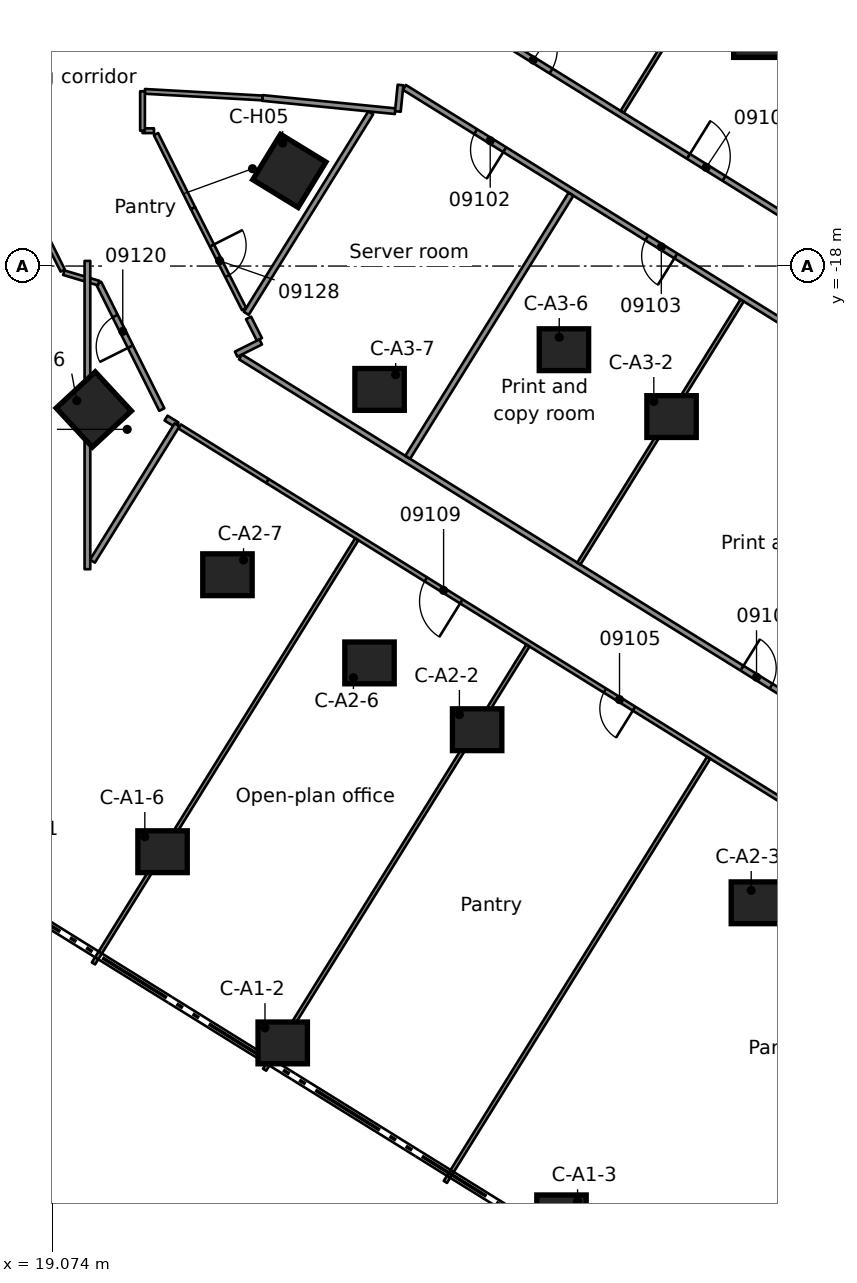
"""IFC4 building model, lengths in metres.
Left out: names, types, materials, properties, quantities, classifications, styles, units other than length and angle.
Written with IfcOpenShell. Run it as: python <this file> out.ifc"""

import sys

from ifc_helpers import new_model, si_unit, direction, frame, frame_2d, origin, origin_2d, place, context, subcontext, project, spatial, rectangle, extrude, element, fill, save


model = new_model("IFC4")
c1 = context("Model", 3, precision=1e-05, world=origin(), true_north=direction((0.0, 1.0)))
c2 = subcontext(c1, "Body", "Model", "MODEL_VIEW")
j1 = project(units=[si_unit("LENGTHUNIT", "METRE"), si_unit("PLANEANGLEUNIT", "RADIAN")], contexts=[c1])
p1 = place(None, origin())
s1 = spatial("IfcSite", under=j1, at=p1, CompositionType="ELEMENT")
p2 = place(p1, origin())
s2 = spatial("IfcBuilding", under=s1, at=p2, CompositionType="ELEMENT")
p3 = place(p2, frame((0.0, 0.0, 40.8)))
s3 = spatial("IfcBuildingStorey", under=s2, at=p3, CompositionType="ELEMENT", Elevation=40.8)
for number, where, z_axis, x_axis in (
    (1, (25.139, -38.441, 0.0), (0.0, 0.0, 1.0), (1.0, 0.0, 0.0)),
    (2, (32.475, -42.992, 0.0), (0.0, 0.0, 1.0), (1.0, 0.0, 0.0)),
    (3, (21.977, -33.41, 0.0), (0.0, 0.0, 1.0), (1.0, 0.0, 0.0)),
    (4, (30.255, -30.2, 0.0), (0.0, 0.0, 1.0), (1.0, 0.0, 0.0)),
    (5, (37.59, -34.754, 0.0), (0.0, 0.0, 1.0), (1.0, 0.0, 0.0)),
    (6, (27.423, -28.442, 0.0), (0.0, 0.0, 1.0), (1.0, 0.0, 0.0)),
    (7, (23.685, -26.122, 0.0), (0.0, 0.0, 1.0), (1.0, 0.0, 0.0)),
    (8, (35.371, -21.96, 0.0), (0.0, 0.0, 1.0), (1.0, 0.0, 0.0)),
    (9, (32.539, -20.201, 0.0), (0.0, 0.0, 1.0), (1.0, 0.0, 0.0)),
    (10, (27.688, -21.246, 0.0), (0.0, 0.0, 1.0), (1.0, 0.0, 0.0)),
    (11, (37.655, -11.96, 0.0), (0.0, 0.0, 1.0), (1.0, 0.0, 0.0)),
):
    element("IfcColumn", number, at=place(p3, frame(where, z_axis=z_axis, x_axis=x_axis)), inside=s3, PredefinedType="COLUMN", context=c2, shape_type="SweptSolid", body=[
        extrude(rectangle(XDim=1.3, YDim=1.1, at=origin_2d()), origin(), (0.0, 0.0, 1.0), 3.5),
    ])
for number, where, z_axis, x_axis in (
    (12, (25.313, -15.495, 0.0), (0.0, 0.0, 1.0), (0.853, -0.522, 0.0)),
    (13, (20.167, -21.774, 0.0), (0.0, 0.0, 1.0), (0.68, -0.734, 0.0)),
):
    element("IfcColumn", number, at=place(p3, frame(where, z_axis=z_axis, x_axis=x_axis)), inside=s3, PredefinedType="COLUMN", context=c2, shape_type="SweptSolid", body=[
        extrude(rectangle(XDim=1.4, YDim=1.4, at=origin_2d()), origin(), (0.0, 0.0, 1.0), 3.5),
    ])
p4 = place(p3, frame((17.564, -14.541, 0.0), z_axis=(0.0, 0.0, 1.0), x_axis=(0.446749443477, -0.894659116509, 0.0)))
e14 = element("IfcWall", 14, at=p4, inside=s3, PredefinedType="PARTITIONING", context=c2, shape_type="SweptSolid", body=[
    extrude(rectangle(XDim=3.998, YDim=0.125, at=frame_2d((1.999, 0.0))), origin(), (0.0, 0.0, 1.0), 3.06),
])
p5 = place(p3, frame((21.957, -21.776, 0.0), z_axis=(0.0, 0.0, 1.0), x_axis=(-0.446609612261, 0.894728927797, 0.0)))
e15 = element("IfcWall", 15, at=p5, inside=s3, PredefinedType="PARTITIONING", context=c2, shape_type="SweptSolid", body=[
    extrude(rectangle(XDim=3.719, YDim=0.15, at=frame_2d((1.86, 0.0))), origin(), (0.0, 0.0, 1.0), 3.06),
])
p6 = place(p5, frame((1.85, 0.0, 0.0)))
e16 = element("IfcOpeningElement", 16, at=p6, cuts=e15, PredefinedType="OPENING", context=c2, shape_type="SweptSolid", body=[
    extrude(rectangle(XDim=0.9, YDim=2.1, at=frame_2d((0.45, 1.05))), frame((0.0, 0.085, 0.0), z_axis=(0.0, -1.0, 0.0), x_axis=(1.0, 0.0, 0.0)), (0.0, 0.0, 1.0), 0.17),
])
p7 = place(p3, frame((21.805, -14.527, 0.0), z_axis=(0.0, 0.0, 1.0), x_axis=(0.446720903114, -0.894673367616, 0.0)))
e17 = element("IfcWall", 17, at=p7, inside=s3, PredefinedType="PARTITIONING", context=c2, shape_type="SweptSolid", body=[
    extrude(rectangle(XDim=2.181, YDim=0.125, at=frame_2d((1.09, 0.0))), origin(), (0.0, 0.0, 1.0), 3.06),
])
p8 = place(p3, frame((24.24, -19.364, 0.0), z_axis=(0.0, 0.0, 1.0), x_axis=(0.451527001133, -0.892257455698, 0.0)))
e18 = element("IfcWall", 18, at=p8, inside=s3, PredefinedType="PARTITIONING", context=c2, shape_type="SweptSolid", body=[
    extrude(rectangle(XDim=0.633, YDim=0.15, at=frame_2d((0.316, 0.0))), origin(), (0.0, 0.0, 1.0), 3.06),
])
p9 = place(p3, frame((22.779, -16.478, 0.0), z_axis=(0.0, 0.0, 1.0), x_axis=(0.451638349486, -0.892201099121, 0.0)))
e19 = element("IfcWall", 19, at=p9, inside=s3, PredefinedType="PARTITIONING", context=c2, shape_type="SweptSolid", body=[
    extrude(rectangle(XDim=2.976, YDim=0.125, at=frame_2d((1.488, 0.0))), origin(), (0.0, 0.0, 1.0), 3.06),
])
p10 = place(p9, frame((1.1, 0.0, 0.0)))
e20 = element("IfcOpeningElement", 20, at=p10, cuts=e19, PredefinedType="OPENING", context=c2, shape_type="SweptSolid", body=[
    extrude(rectangle(XDim=0.9, YDim=2.1, at=frame_2d((0.45, 1.05))), frame((0.0, 0.073, 0.0), z_axis=(0.0, -1.0, 0.0), x_axis=(1.0, 0.0, 0.0)), (0.0, 0.0, 1.0), 0.145),
])
p11 = place(p3, frame((22.424, -22.219, 0.0), z_axis=(0.0, 0.0, 1.0), x_axis=(0.849454635984, -0.527661654287, 0.0)))
e21 = element("IfcWall", 21, at=p11, inside=s3, PredefinedType="PARTITIONING", context=c2, shape_type="SweptSolid", body=[
    extrude(rectangle(XDim=2.725, YDim=0.125, at=frame_2d((1.363, 0.0))), origin(), (0.0, 0.0, 1.0), 3.06),
])
p12 = place(p3, frame((22.069, -22.0, 0.0), z_axis=(0.0, 0.0, 1.0), x_axis=(0.850050687586, -0.526700890956, 0.0)))
e22 = element("IfcWall", 22, at=p12, inside=s3, PredefinedType="PARTITIONING", context=c2, shape_type="SweptSolid", body=[
    extrude(rectangle(XDim=0.34, YDim=0.15, at=frame_2d((0.17, 0.0))), origin(), (0.0, 0.0, 1.0), 3.06),
])
p13 = place(p3, frame((43.367, -35.223, 0.0), z_axis=(0.0, 0.0, 1.0), x_axis=(-0.849563429412, 0.527486473197, 0.0)))
e23 = element("IfcWall", 23, at=p13, inside=s3, PredefinedType="PARTITIONING", context=c2, shape_type="SweptSolid", body=[
    extrude(rectangle(XDim=21.927, YDim=0.125, at=frame_2d((10.963, 0.0))), origin(), (0.0, 0.0, 1.0), 3.06),
])
p14 = place(p13, frame((10.574, 0.0, 0.0)))
e24 = element("IfcOpeningElement", 24, at=p14, cuts=e23, PredefinedType="OPENING", context=c2, shape_type="SweptSolid", body=[
    extrude(rectangle(XDim=0.9, YDim=2.1, at=frame_2d((0.45, 1.05))), frame((0.0, 0.073, 0.0), z_axis=(0.0, -1.0, 0.0), x_axis=(1.0, 0.0, 0.0)), (0.0, 0.0, 1.0), 0.145),
])
p15 = place(p13, frame((4.973, 0.0, 0.0)))
e25 = element("IfcOpeningElement", 25, at=p15, cuts=e23, PredefinedType="OPENING", context=c2, shape_type="SweptSolid", body=[
    extrude(rectangle(XDim=0.9, YDim=2.1, at=frame_2d((0.45, 1.05))), frame((0.0, 0.073, 0.0), z_axis=(0.0, -1.0, 0.0), x_axis=(1.0, 0.0, 0.0)), (0.0, 0.0, 1.0), 0.145),
])
p16 = place(p13, frame((15.923, 0.0, 0.0)))
e26 = element("IfcOpeningElement", 26, at=p16, cuts=e23, PredefinedType="OPENING", context=c2, shape_type="SweptSolid", body=[
    extrude(rectangle(XDim=1.1, YDim=2.1, at=frame_2d((0.55, 1.05))), frame((0.0, 0.073, 0.0), z_axis=(0.0, -1.0, 0.0), x_axis=(1.0, 0.0, 0.0)), (0.0, 0.0, 1.0), 0.145),
])
p17 = place(p3, frame((24.028, -20.39, 0.0), z_axis=(0.0, 0.0, 1.0), x_axis=(0.8496545068, -0.527339756775, 0.0)))
e27 = element("IfcWall", 27, at=p17, inside=s3, PredefinedType="PARTITIONING", context=c2, shape_type="SweptSolid", body=[
    extrude(rectangle(XDim=21.569, YDim=0.15, at=frame_2d((10.784, 0.0))), origin(), (0.0, 0.0, 1.0), 3.06),
])
p18 = place(p17, frame((15.532, 0.0, 0.0)))
e28 = element("IfcOpeningElement", 28, at=p18, cuts=e27, PredefinedType="OPENING", context=c2, shape_type="SweptSolid", body=[
    extrude(rectangle(XDim=0.9, YDim=2.1, at=frame_2d((0.45, 1.05))), frame((0.0, 0.085, 0.0), z_axis=(0.0, -1.0, 0.0), x_axis=(1.0, 0.0, 0.0)), (0.0, 0.0, 1.0), 0.17),
])
p19 = place(p3, frame((46.73, -24.716, 0.0), z_axis=(0.0, 0.0, 1.0), x_axis=(-0.849574284109, 0.527468990349, 0.0)))
e29 = element("IfcWall", 29, at=p19, inside=s3, PredefinedType="PARTITIONING", context=c2, shape_type="SweptSolid", body=[
    extrude(rectangle(XDim=21.645, YDim=0.15, at=frame_2d((10.822, 0.0))), origin(), (0.0, 0.0, 1.0), 3.06),
])
p20 = place(p19, frame((18.537, 0.0, 0.0)))
e30 = element("IfcOpeningElement", 30, at=p20, cuts=e29, PredefinedType="OPENING", context=c2, shape_type="SweptSolid", body=[
    extrude(rectangle(XDim=0.9, YDim=2.1, at=frame_2d((0.45, 1.05))), frame((0.0, 0.085, 0.0), z_axis=(0.0, -1.0, 0.0), x_axis=(1.0, 0.0, 0.0)), (0.0, 0.0, 1.0), 0.17),
])
p21 = place(p19, frame((13.237, 0.0, 0.0)))
e31 = element("IfcOpeningElement", 31, at=p21, cuts=e29, PredefinedType="OPENING", context=c2, shape_type="SweptSolid", body=[
    extrude(rectangle(XDim=0.9, YDim=2.1, at=frame_2d((0.45, 1.05))), frame((0.0, 0.085, 0.0), z_axis=(0.0, -1.0, 0.0), x_axis=(1.0, 0.0, 0.0)), (0.0, 0.0, 1.0), 0.17),
])
p22 = place(p3, frame((29.31, -11.074, 0.0), z_axis=(0.0, 0.0, 1.0), x_axis=(0.849545912719, -0.527514684329, 0.0)))
e32 = element("IfcWall", 32, at=p22, inside=s3, PredefinedType="PARTITIONING", context=c2, shape_type="SweptSolid", body=[
    extrude(rectangle(XDim=24.457, YDim=0.15, at=frame_2d((12.228, 0.0))), origin(), (0.0, 0.0, 1.0), 3.06),
])
p23 = place(p22, frame((2.3, 0.0, 0.0)))
e33 = element("IfcOpeningElement", 33, at=p23, cuts=e32, PredefinedType="OPENING", context=c2, shape_type="SweptSolid", body=[
    extrude(rectangle(XDim=1.1, YDim=2.1, at=frame_2d((0.55, 1.05))), frame((0.0, 0.085, 0.0), z_axis=(0.0, -1.0, 0.0), x_axis=(1.0, 0.0, 0.0)), (0.0, 0.0, 1.0), 0.17),
])
p24 = place(p22, frame((7.658, 0.0, 0.0)))
e34 = element("IfcOpeningElement", 34, at=p24, cuts=e32, PredefinedType="OPENING", context=c2, shape_type="SweptSolid", body=[
    extrude(rectangle(XDim=1.1, YDim=2.1, at=frame_2d((0.55, 1.05))), frame((0.0, 0.085, 0.0), z_axis=(0.0, -1.0, 0.0), x_axis=(1.0, 0.0, 0.0)), (0.0, 0.0, 1.0), 0.17),
])
p25 = place(p22, frame((13.207, 0.0, 0.0)))
e35 = element("IfcOpeningElement", 35, at=p25, cuts=e32, PredefinedType="OPENING", context=c2, shape_type="SweptSolid", body=[
    extrude(rectangle(XDim=0.9, YDim=2.1, at=frame_2d((0.45, 1.05))), frame((0.0, 0.085, 0.0), z_axis=(0.0, -1.0, 0.0), x_axis=(1.0, 0.0, 0.0)), (0.0, 0.0, 1.0), 0.17),
])
p26 = place(p22, frame((18.806, 0.0, 0.0)))
e36 = element("IfcOpeningElement", 36, at=p26, cuts=e32, PredefinedType="OPENING", context=c2, shape_type="SweptSolid", body=[
    extrude(rectangle(XDim=0.9, YDim=2.1, at=frame_2d((0.45, 1.05))), frame((0.0, 0.085, 0.0), z_axis=(0.0, -1.0, 0.0), x_axis=(1.0, 0.0, 0.0)), (0.0, 0.0, 1.0), 0.17),
])
p27 = place(p3, frame((24.604, -13.577, 0.0), z_axis=(0.0, 0.0, 1.0), x_axis=(0.995072238477, -0.099152610724, 0.0)))
e37 = element("IfcWall", 37, at=p27, inside=s3, PredefinedType="PARTITIONING", context=c2, shape_type="SweptSolid", body=[
    extrude(rectangle(XDim=3.511, YDim=0.15, at=frame_2d((1.756, 0.0))), origin(), (0.0, 0.0, 1.0), 3.06),
])
p28 = place(p3, frame((24.604, -13.577, 0.0), z_axis=(0.0, 0.0, 1.0), x_axis=(-0.998441130735, 0.055814948327, 0.0)))
e38 = element("IfcWall", 38, at=p28, inside=s3, PredefinedType="PARTITIONING", context=c2, shape_type="SweptSolid", body=[
    extrude(rectangle(XDim=3.097, YDim=0.125, at=frame_2d((1.548, 0.0))), origin(), (0.0, 0.0, 1.0), 3.06),
])
p29 = place(p3, frame((21.45, -14.439, 0.0), z_axis=(0.0, 0.0, 1.0), x_axis=(1.0, 0.0, 0.0)))
e39 = element("IfcWall", 39, at=p29, inside=s3, PredefinedType="PARTITIONING", context=c2, shape_type="SweptSolid", body=[
    extrude(rectangle(XDim=0.302, YDim=0.125, at=frame_2d((0.151, 0.0))), origin(), (0.0, 0.0, 1.0), 3.06),
])
p30 = place(p3, frame((23.914, -20.319, 0.0), z_axis=(0.0, 0.0, 1.0), x_axis=(0.894967710853, 0.4461309186, 0.0)))
e40 = element("IfcWall", 40, at=p30, inside=s3, PredefinedType="PARTITIONING", context=c2, shape_type="SweptSolid", body=[
    extrude(rectangle(XDim=0.722, YDim=0.15, at=frame_2d((0.361, 0.0))), origin(), (0.0, 0.0, 1.0), 3.06),
])
p31 = place(p3, frame((19.379, -18.175, 0.0), z_axis=(0.0, 0.0, 1.0), x_axis=(0.958442111331, -0.285287082127, 0.0)))
e41 = element("IfcWall", 41, at=p31, inside=s3, PredefinedType="PARTITIONING", context=c2, shape_type="SweptSolid", body=[
    extrude(rectangle(XDim=0.957, YDim=0.125, at=frame_2d((0.479, 0.0))), origin(), (0.0, 0.0, 1.0), 3.06),
])
p32 = place(p3, frame((29.419, -42.099, 0.0), z_axis=(0.0, 0.0, 1.0), x_axis=(0.527437340002, 0.849593933813, 0.0)))
e42 = element("IfcWall", 42, at=p32, inside=s3, PredefinedType="PARTITIONING", context=c2, shape_type="SweptSolid", body=[
    extrude(rectangle(XDim=13.137, YDim=0.1, at=frame_2d((6.568, 0.0))), origin(), (0.0, 0.0, 1.0), 3.06),
])
p33 = place(p3, frame((24.662, -39.146, 0.0), z_axis=(0.0, 0.0, 1.0), x_axis=(0.527445667816, 0.849588763757, 0.0)))
e43 = element("IfcWall", 43, at=p33, inside=s3, PredefinedType="PARTITIONING", context=c2, shape_type="SweptSolid", body=[
    extrude(rectangle(XDim=13.137, YDim=0.1, at=frame_2d((6.568, 0.0))), origin(), (0.0, 0.0, 1.0), 3.06),
])
p34 = place(p3, frame((32.931, -25.828, 0.0), z_axis=(0.0, 0.0, 1.0), x_axis=(0.527378524743, 0.849630444158, 0.0)))
e44 = element("IfcWall", 44, at=p34, inside=s3, PredefinedType="PARTITIONING", context=c2, shape_type="SweptSolid", body=[
    extrude(rectangle(XDim=8.148, YDim=0.1, at=frame_2d((4.074, 0.0))), origin(), (0.0, 0.0, 1.0), 3.06),
])
p35 = place(p3, frame((20.159, -36.35, 0.0), z_axis=(0.0, 0.0, 1.0), x_axis=(0.527437340002, 0.849593933813, 0.0)))
e45 = element("IfcWall", 45, at=p35, inside=s3, PredefinedType="PARTITIONING", context=c2, shape_type="SweptSolid", body=[
    extrude(rectangle(XDim=13.137, YDim=0.1, at=frame_2d((6.568, 0.0))), origin(), (0.0, 0.0, 1.0), 3.06),
])
p36 = place(p3, frame((28.428, -23.032, 0.0), z_axis=(0.0, 0.0, 1.0), x_axis=(0.527432232041, 0.84959710487, 0.0)))
e46 = element("IfcWall", 46, at=p36, inside=s3, PredefinedType="PARTITIONING", context=c2, shape_type="SweptSolid", body=[
    extrude(rectangle(XDim=8.147, YDim=0.15, at=frame_2d((4.074, 0.0))), origin(), (0.0, 0.0, 1.0), 3.06),
])
p37 = place(p3, frame((34.072, -13.942, 0.0), z_axis=(0.0, 0.0, 1.0), x_axis=(0.527437304247, 0.84959395601, 0.0)))
e47 = element("IfcWall", 47, at=p37, inside=s3, PredefinedType="PARTITIONING", context=c2, shape_type="SweptSolid", body=[
    extrude(rectangle(XDim=14.123, YDim=0.1, at=frame_2d((7.062, 0.0))), origin(), (0.0, 0.0, 1.0), 3.06),
])
p38 = place(p3, frame((20.132, -25.765, 0.0), z_axis=(0.0, 0.0, 1.0), x_axis=(0.527375821056, 0.849632122372, 0.0)))
e48 = element("IfcWall", 48, at=p38, inside=s3, PredefinedType="PARTITIONING", context=c2, shape_type="SweptSolid", body=[
    extrude(rectangle(XDim=4.22, YDim=0.15, at=frame_2d((2.11, 0.0))), origin(), (0.0, 0.0, 1.0), 3.06),
])
p39 = place(p3, frame((24.18, -19.245, 0.0), z_axis=(0.0, 0.0, 1.0), x_axis=(0.527399070795, 0.849617690567, 0.0)))
e49 = element("IfcWall", 49, at=p39, inside=s3, PredefinedType="PARTITIONING", context=c2, shape_type="SweptSolid", body=[
    extrude(rectangle(XDim=6.21, YDim=0.15, at=frame_2d((3.105, 0.0))), origin(), (0.0, 0.0, 1.0), 3.06),
])
p40 = place(p3, frame((28.169, -13.932, 0.0), z_axis=(0.0, 0.0, 1.0), x_axis=(0.100195004938, 0.99496781907, 0.0)))
e50 = element("IfcWall", 50, at=p40, inside=s3, PredefinedType="PARTITIONING", context=c2, shape_type="SweptSolid", body=[
    extrude(rectangle(XDim=0.699, YDim=0.15, at=frame_2d((0.35, 0.0))), origin(), (0.0, 0.0, 1.0), 3.06),
])
p41 = place(p3, frame((21.45, -14.439, 0.0), z_axis=(0.0, 0.0, 1.0), x_axis=(0.0, 1.0, 0.0)))
e51 = element("IfcWall", 51, at=p41, inside=s3, PredefinedType="PARTITIONING", context=c2, shape_type="SweptSolid", body=[
    extrude(rectangle(XDim=1.039, YDim=0.125, at=frame_2d((0.52, 0.0))), origin(), (0.0, 0.0, 1.0), 3.06),
])
p42 = place(p3, frame((20.0, -25.977, 0.0), z_axis=(0.0, 0.0, 1.0), x_axis=(0.0, 1.0, 0.0)))
e52 = element("IfcWall", 52, at=p42, inside=s3, PredefinedType="PARTITIONING", context=c2, shape_type="SweptSolid", body=[
    extrude(rectangle(XDim=8.112, YDim=0.15, at=frame_2d((4.056, 0.0))), origin(), (0.0, 0.0, 1.0), 3.06),
])
p43 = place(p23, origin())
e53 = element("IfcDoor", 53, at=p43, inside=s3, OperationType="SINGLE_SWING_LEFT", PredefinedType="DOOR", context=c2, shape_type="SweptSolid", body=[
    extrude(rectangle(XDim=1.1, YDim=2.1, at=frame_2d((0.55, 1.05))), frame((0.0, 0.025, 0.0), z_axis=(0.0, -1.0, 0.0), x_axis=(1.0, 0.0, 0.0)), (0.0, 0.0, 1.0), 0.05),
])
fill(e33, e53)
p44 = place(p24, origin())
e54 = element("IfcDoor", 54, at=p44, inside=s3, OperationType="SINGLE_SWING_LEFT", PredefinedType="DOOR", context=c2, shape_type="SweptSolid", body=[
    extrude(rectangle(XDim=1.1, YDim=2.1, at=frame_2d((0.55, 1.05))), frame((0.0, 0.025, 0.0), z_axis=(0.0, -1.0, 0.0), x_axis=(1.0, 0.0, 0.0)), (0.0, 0.0, 1.0), 0.05),
])
fill(e34, e54)
p45 = place(p20, origin())
e55 = element("IfcDoor", 55, at=p45, inside=s3, OperationType="SINGLE_SWING_RIGHT", PredefinedType="DOOR", context=c2, shape_type="SweptSolid", body=[
    extrude(rectangle(XDim=0.9, YDim=2.1, at=frame_2d((0.45, 1.05))), frame((0.0, 0.025, 0.0), z_axis=(0.0, -1.0, 0.0), x_axis=(1.0, 0.0, 0.0)), (0.0, 0.0, 1.0), 0.05),
])
fill(e30, e55)
p46 = place(p21, origin())
e56 = element("IfcDoor", 56, at=p46, inside=s3, OperationType="SINGLE_SWING_RIGHT", PredefinedType="DOOR", context=c2, shape_type="SweptSolid", body=[
    extrude(rectangle(XDim=0.9, YDim=2.1, at=frame_2d((0.45, 1.05))), frame((0.0, 0.025, 0.0), z_axis=(0.0, -1.0, 0.0), x_axis=(1.0, 0.0, 0.0)), (0.0, 0.0, 1.0), 0.05),
])
fill(e31, e56)
p47 = place(p14, origin())
e57 = element("IfcDoor", 57, at=p47, inside=s3, OperationType="SINGLE_SWING_RIGHT", PredefinedType="DOOR", context=c2, shape_type="SweptSolid", body=[
    extrude(rectangle(XDim=0.9, YDim=2.1, at=frame_2d((0.45, 1.05))), frame((0.0, 0.025, 0.0), z_axis=(0.0, -1.0, 0.0), x_axis=(1.0, 0.0, 0.0)), (0.0, 0.0, 1.0), 0.05),
])
fill(e24, e57)
p48 = place(p18, origin())
e58 = element("IfcDoor", 58, at=p48, inside=s3, OperationType="SINGLE_SWING_RIGHT", PredefinedType="DOOR", context=c2, shape_type="SweptSolid", body=[
    extrude(rectangle(XDim=0.9, YDim=2.1, at=frame_2d((0.45, 1.05))), frame((0.0, 0.025, 0.0), z_axis=(0.0, -1.0, 0.0), x_axis=(1.0, 0.0, 0.0)), (0.0, 0.0, 1.0), 0.05),
])
fill(e28, e58)
p49 = place(p16, origin())
e59 = element("IfcDoor", 59, at=p49, inside=s3, OperationType="SINGLE_SWING_RIGHT", PredefinedType="DOOR", context=c2, shape_type="SweptSolid", body=[
    extrude(rectangle(XDim=1.1, YDim=2.1, at=frame_2d((0.55, 1.05))), frame((0.0, 0.025, 0.0), z_axis=(0.0, -1.0, 0.0), x_axis=(1.0, 0.0, 0.0)), (0.0, 0.0, 1.0), 0.05),
])
fill(e26, e59)
p50 = place(p6, origin())
e60 = element("IfcDoor", 60, at=p50, inside=s3, OperationType="SINGLE_SWING_RIGHT", PredefinedType="DOOR", context=c2, shape_type="SweptSolid", body=[
    extrude(rectangle(XDim=0.9, YDim=2.1, at=frame_2d((0.45, 1.05))), frame((0.0, 0.025, 0.0), z_axis=(0.0, -1.0, 0.0), x_axis=(1.0, 0.0, 0.0)), (0.0, 0.0, 1.0), 0.05),
])
fill(e16, e60)
p51 = place(p10, origin())
e61 = element("IfcDoor", 61, at=p51, inside=s3, OperationType="SINGLE_SWING_RIGHT", PredefinedType="DOOR", context=c2, shape_type="SweptSolid", body=[
    extrude(rectangle(XDim=0.9, YDim=2.1, at=frame_2d((0.45, 1.05))), frame((0.0, 0.025, 0.0), z_axis=(0.0, -1.0, 0.0), x_axis=(1.0, 0.0, 0.0)), (0.0, 0.0, 1.0), 0.05),
])
fill(e20, e61)
save(model, sys.argv[1])
